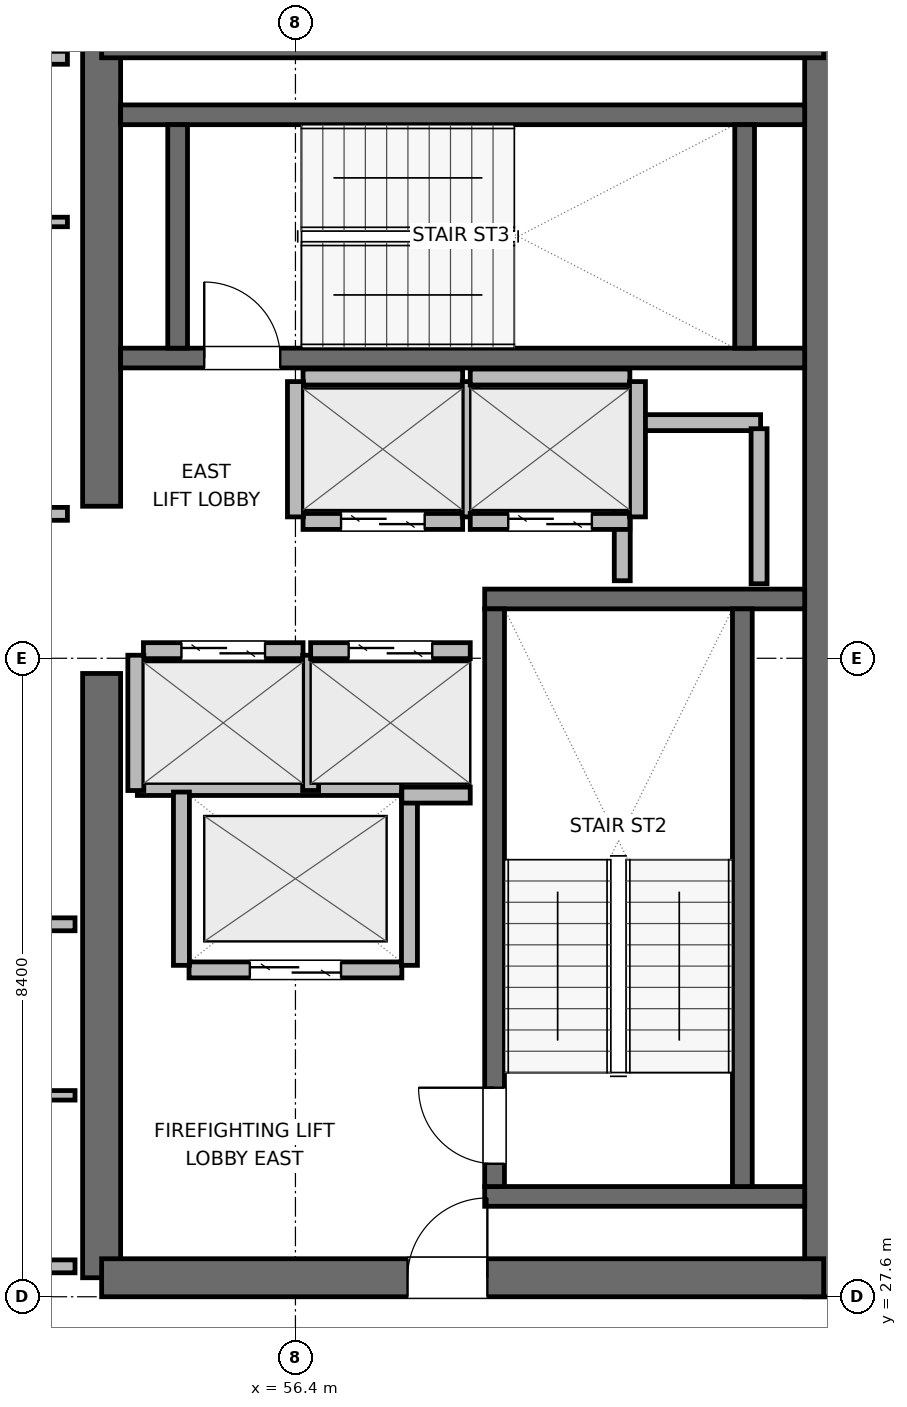
"""IFC4 building model, lengths in metres.
Left out: names, types, materials, properties, quantities, classifications, styles, units other than length and angle.
Written with IfcOpenShell. Run it as: python <this file> out.ifc"""

import sys

from ifc_helpers import new_model, si_unit, direction, frame, frame_2d, origin, place, context, subcontext, project, spatial, rectangle, extrude, element, fill, save


model = new_model("IFC4")
c1 = context("Model", 3, precision=1e-05, world=origin(), true_north=direction((0.0, 1.0)))
c2 = subcontext(c1, "Body", "Model", "MODEL_VIEW")
j1 = project(units=[si_unit("LENGTHUNIT", "METRE"), si_unit("PLANEANGLEUNIT", "RADIAN")], contexts=[c1])
p1 = place(None, origin())
s1 = spatial("IfcSite", under=j1, at=p1, CompositionType="ELEMENT")
p2 = place(p1, origin())
s2 = spatial("IfcBuilding", under=s1, at=p2, CompositionType="ELEMENT")
p3 = place(p2, frame((0.0, 0.0, 286.2)))
s3 = spatial("IfcBuildingStorey", under=s2, at=p3, CompositionType="ELEMENT", Elevation=286.2)
p4 = place(p3, frame((53.85, 27.85, 0.0), z_axis=(0.0, 0.0, 1.0), x_axis=(0.0, 1.0, 0.0)))
e1 = element("IfcWall", 1, at=p4, inside=s3, PredefinedType="SHEAR", context=c2, shape_type="SweptSolid", body=[
    extrude(rectangle(XDim=7.95, YDim=0.5, at=frame_2d((3.975, 0.0))), origin(), (0.0, 0.0, 1.0), 3.9),
])
p5 = place(p3, frame((53.85, 38.0, 0.0), z_axis=(0.0, 0.0, 1.0), x_axis=(0.0, 1.0, 0.0)))
e2 = element("IfcWall", 2, at=p5, inside=s3, PredefinedType="SHEAR", context=c2, shape_type="SweptSolid", body=[
    extrude(rectangle(XDim=6.15, YDim=0.5, at=frame_2d((3.075, 0.0))), origin(), (0.0, 0.0, 1.0), 3.9),
])
p6 = place(p3, frame((63.35, 27.6, 0.0), z_axis=(0.0, 0.0, 1.0), x_axis=(0.0, 1.0, 0.0)))
e3 = element("IfcWall", 3, at=p6, inside=s3, PredefinedType="SHEAR", context=c2, shape_type="SweptSolid", body=[
    extrude(rectangle(XDim=16.8, YDim=0.5, at=frame_2d((8.4, 0.0))), origin(), (0.0, 0.0, 1.0), 3.9),
])
p7 = place(p3, frame((53.85, 27.85, 0.0), z_axis=(0.0, 0.0, 1.0), x_axis=(1.0, 0.0, 0.0)))
e4 = element("IfcWall", 4, at=p7, inside=s3, PredefinedType="SHEAR", context=c2, shape_type="SweptSolid", body=[
    extrude(rectangle(XDim=9.5, YDim=0.5, at=frame_2d((4.75, 0.0))), origin(), (0.0, 0.0, 1.0), 3.9),
])
p8 = place(p7, frame((4.025, 0.0, 0.0)))
e5 = element("IfcOpeningElement", 5, at=p8, cuts=e4, PredefinedType="OPENING", context=c2, shape_type="SweptSolid", body=[
    extrude(rectangle(XDim=1.05, YDim=2.04, at=frame_2d((0.525, 1.02))), frame((0.0, 0.26, 0.0), z_axis=(0.0, -1.0, 0.0), x_axis=(1.0, 0.0, 0.0)), (0.0, 0.0, 1.0), 0.52),
])
p9 = place(p3, frame((53.85, 44.15, 0.0), z_axis=(0.0, 0.0, 1.0), x_axis=(1.0, 0.0, 0.0)))
e6 = element("IfcWall", 6, at=p9, inside=s3, PredefinedType="SHEAR", context=c2, shape_type="SweptSolid", body=[
    extrude(rectangle(XDim=9.5, YDim=0.5, at=frame_2d((4.75, 0.0))), origin(), (0.0, 0.0, 1.0), 3.9),
])
for number, where, z_axis, x_axis in (
    (7, (58.89, 28.92, 0.0), (0.0, 0.0, 1.0), (1.0, 0.0, 0.0)),
    (8, (58.89, 36.78, 0.0), (0.0, 0.0, 1.0), (1.0, 0.0, 0.0)),
):
    element("IfcWall", number, at=place(p3, frame(where, z_axis=z_axis, x_axis=x_axis)), inside=s3, PredefinedType="SHEAR", context=c2, shape_type="SweptSolid", body=[
        extrude(rectangle(XDim=4.21, YDim=0.26, at=frame_2d((2.105, 0.0))), origin(), (0.0, 0.0, 1.0), 3.9),
    ])
p10 = place(p3, frame((59.02, 29.05, 0.0), z_axis=(0.0, 0.0, 1.0), x_axis=(0.0, 1.0, 0.0)))
e9 = element("IfcWall", 9, at=p10, inside=s3, PredefinedType="SHEAR", context=c2, shape_type="SweptSolid", body=[
    extrude(rectangle(XDim=7.6, YDim=0.26, at=frame_2d((3.8, 0.0))), origin(), (0.0, 0.0, 1.0), 3.9),
])
p11 = place(p10, frame((0.3, 0.0, 0.0)))
e10 = element("IfcOpeningElement", 10, at=p11, cuts=e9, PredefinedType="OPENING", context=c2, shape_type="SweptSolid", body=[
    extrude(rectangle(XDim=1.0, YDim=2.04, at=frame_2d((0.5, 1.02))), frame((0.0, 0.14, 0.0), z_axis=(0.0, -1.0, 0.0), x_axis=(1.0, 0.0, 0.0)), (0.0, 0.0, 1.0), 0.28),
])
p12 = place(p3, frame((62.28, 29.05, 0.0), z_axis=(0.0, 0.0, 1.0), x_axis=(0.0, 1.0, 0.0)))
e11 = element("IfcWall", 11, at=p12, inside=s3, PredefinedType="SHEAR", context=c2, shape_type="SweptSolid", body=[
    extrude(rectangle(XDim=7.6, YDim=0.26, at=frame_2d((3.8, 0.0))), origin(), (0.0, 0.0, 1.0), 3.9),
])
p13 = place(p3, frame((54.1, 39.95, 0.0), z_axis=(0.0, 0.0, 1.0), x_axis=(1.0, 0.0, 0.0)))
e12 = element("IfcWall", 12, at=p13, inside=s3, PredefinedType="SHEAR", context=c2, shape_type="SweptSolid", body=[
    extrude(rectangle(XDim=9.0, YDim=0.26, at=frame_2d((4.5, 0.0))), origin(), (0.0, 0.0, 1.0), 3.9),
])
p14 = place(p13, frame((1.1, 0.0, 0.0)))
e13 = element("IfcOpeningElement", 13, at=p14, cuts=e12, PredefinedType="OPENING", context=c2, shape_type="SweptSolid", body=[
    extrude(rectangle(XDim=1.0, YDim=2.04, at=frame_2d((0.5, 1.02))), frame((0.0, 0.14, 0.0), z_axis=(0.0, -1.0, 0.0), x_axis=(1.0, 0.0, 0.0)), (0.0, 0.0, 1.0), 0.28),
])
p15 = place(p3, frame((54.1, 43.15, 0.0), z_axis=(0.0, 0.0, 1.0), x_axis=(1.0, 0.0, 0.0)))
e14 = element("IfcWall", 14, at=p15, inside=s3, PredefinedType="SHEAR", context=c2, shape_type="SweptSolid", body=[
    extrude(rectangle(XDim=9.0, YDim=0.26, at=frame_2d((4.5, 0.0))), origin(), (0.0, 0.0, 1.0), 3.9),
])
for number, where, z_axis, x_axis in (
    (15, (54.85, 40.08, 0.0), (0.0, 0.0, 1.0), (0.0, 1.0, 0.0)),
    (16, (62.31, 40.08, 0.0), (0.0, 0.0, 1.0), (0.0, 1.0, 0.0)),
):
    element("IfcWall", number, at=place(p3, frame(where, z_axis=z_axis, x_axis=x_axis)), inside=s3, PredefinedType="SHEAR", context=c2, shape_type="SweptSolid", body=[
        extrude(rectangle(XDim=2.94, YDim=0.26, at=frame_2d((1.47, 0.0))), origin(), (0.0, 0.0, 1.0), 3.9),
    ])
p16 = place(p3, frame((60.72, 39.1, 0.0), z_axis=(0.0, 0.0, 1.0), x_axis=(1.0, 0.0, 0.0)))
e17 = element("IfcWall", 17, at=p16, inside=s3, PredefinedType="PARTITIONING", context=c2, shape_type="SweptSolid", body=[
    extrude(rectangle(XDim=1.8, YDim=0.21, at=frame_2d((0.9, 0.0))), origin(), (0.0, 0.0, 1.0), 3.68),
])
p17 = place(p3, frame((60.7, 37.02, 0.0), z_axis=(0.0, 0.0, 1.0), x_axis=(0.0, 1.0, 0.0)))
e18 = element("IfcWall", 18, at=p17, inside=s3, PredefinedType="PARTITIONING", context=c2, shape_type="SweptSolid", body=[
    extrude(rectangle(XDim=1.96, YDim=0.21, at=frame_2d((0.98, 0.0))), origin(), (0.0, 0.0, 1.0), 3.68),
])
p18 = place(p3, frame((62.5, 36.98, 0.0), z_axis=(0.0, 0.0, 1.0), x_axis=(0.0, 1.0, 0.0)))
e19 = element("IfcWall", 19, at=p18, inside=s3, PredefinedType="PARTITIONING", context=c2, shape_type="SweptSolid", body=[
    extrude(rectangle(XDim=2.04, YDim=0.21, at=frame_2d((1.02, 0.0))), origin(), (0.0, 0.0, 1.0), 3.68),
])
p19 = place(p3, frame((55.0, 31.9, 0.0), z_axis=(0.0, 0.0, 1.0), x_axis=(1.0, 0.0, 0.0)))
e20 = element("IfcWall", 20, at=p19, inside=s3, PredefinedType="PARTITIONING", context=c2, shape_type="SweptSolid", body=[
    extrude(rectangle(XDim=2.8, YDim=0.21, at=frame_2d((1.4, 0.0))), origin(), (0.0, 0.0, 1.0), 3.68),
])
p20 = place(p19, frame((0.8, 0.0, 0.0)))
e21 = element("IfcOpeningElement", 21, at=p20, cuts=e20, PredefinedType="OPENING", context=c2, shape_type="SweptSolid", body=[
    extrude(rectangle(XDim=1.2, YDim=2.04, at=frame_2d((0.6, 1.02))), frame((0.0, 0.115, 0.0), z_axis=(0.0, -1.0, 0.0), x_axis=(1.0, 0.0, 0.0)), (0.0, 0.0, 1.0), 0.23),
])
p21 = place(p3, frame((54.32, 34.3, 0.0), z_axis=(0.0, 0.0, 1.0), x_axis=(1.0, 0.0, 0.0)))
e22 = element("IfcWall", 22, at=p21, inside=s3, PredefinedType="PARTITIONING", context=c2, shape_type="SweptSolid", body=[
    extrude(rectangle(XDim=3.48, YDim=0.21, at=frame_2d((1.74, 0.0))), origin(), (0.0, 0.0, 1.0), 3.68),
])
for number, where, z_axis, x_axis in (
    (23, (54.9, 31.96, 0.0), (0.0, 0.0, 1.0), (0.0, 1.0, 0.0)),
    (24, (57.9, 31.96, 0.0), (0.0, 0.0, 1.0), (0.0, 1.0, 0.0)),
):
    element("IfcWall", number, at=place(p3, frame(where, z_axis=z_axis, x_axis=x_axis)), inside=s3, PredefinedType="PARTITIONING", context=c2, shape_type="SweptSolid", body=[
        extrude(rectangle(XDim=2.28, YDim=0.21, at=frame_2d((1.14, 0.0))), origin(), (0.0, 0.0, 1.0), 3.68),
    ])
p22 = place(p3, frame((54.4, 36.1, 0.0), z_axis=(0.0, 0.0, 1.0), x_axis=(1.0, 0.0, 0.0)))
e25 = element("IfcWall", 25, at=p22, inside=s3, PredefinedType="PARTITIONING", context=c2, shape_type="SweptSolid", body=[
    extrude(rectangle(XDim=2.1, YDim=0.21, at=frame_2d((1.05, 0.0))), origin(), (0.0, 0.0, 1.0), 3.68),
])
p23 = place(p22, frame((0.5, 0.0, 0.0)))
e26 = element("IfcOpeningElement", 26, at=p23, cuts=e25, PredefinedType="OPENING", context=c2, shape_type="SweptSolid", body=[
    extrude(rectangle(XDim=1.1, YDim=2.04, at=frame_2d((0.55, 1.02))), frame((0.0, 0.115, 0.0), z_axis=(0.0, -1.0, 0.0), x_axis=(1.0, 0.0, 0.0)), (0.0, 0.0, 1.0), 0.23),
])
for number, where, z_axis, x_axis in (
    (27, (54.3, 34.26, 0.0), (0.0, 0.0, 1.0), (0.0, 1.0, 0.0)),
    (28, (56.6, 34.26, 0.0), (0.0, 0.0, 1.0), (0.0, 1.0, 0.0)),
):
    element("IfcWall", number, at=place(p3, frame(where, z_axis=z_axis, x_axis=x_axis)), inside=s3, PredefinedType="PARTITIONING", context=c2, shape_type="SweptSolid", body=[
        extrude(rectangle(XDim=1.78, YDim=0.21, at=frame_2d((0.89, 0.0))), origin(), (0.0, 0.0, 1.0), 3.68),
    ])
p24 = place(p3, frame((56.6, 36.1, 0.0), z_axis=(0.0, 0.0, 1.0), x_axis=(1.0, 0.0, 0.0)))
e29 = element("IfcWall", 29, at=p24, inside=s3, PredefinedType="PARTITIONING", context=c2, shape_type="SweptSolid", body=[
    extrude(rectangle(XDim=2.1, YDim=0.21, at=frame_2d((1.05, 0.0))), origin(), (0.0, 0.0, 1.0), 3.68),
])
p25 = place(p24, frame((0.5, 0.0, 0.0)))
e30 = element("IfcOpeningElement", 30, at=p25, cuts=e29, PredefinedType="OPENING", context=c2, shape_type="SweptSolid", body=[
    extrude(rectangle(XDim=1.1, YDim=2.04, at=frame_2d((0.55, 1.02))), frame((0.0, 0.115, 0.0), z_axis=(0.0, -1.0, 0.0), x_axis=(1.0, 0.0, 0.0)), (0.0, 0.0, 1.0), 0.23),
])
p26 = place(p3, frame((57.8, 34.2, 0.0), z_axis=(0.0, 0.0, 1.0), x_axis=(1.0, 0.0, 0.0)))
e31 = element("IfcWall", 31, at=p26, inside=s3, PredefinedType="PARTITIONING", context=c2, shape_type="SweptSolid", body=[
    extrude(rectangle(XDim=0.9, YDim=0.21, at=frame_2d((0.45, 0.0))), origin(), (0.0, 0.0, 1.0), 3.68),
])
p27 = place(p3, frame((56.5, 37.8, 0.0), z_axis=(0.0, 0.0, 1.0), x_axis=(1.0, 0.0, 0.0)))
e32 = element("IfcWall", 32, at=p27, inside=s3, PredefinedType="PARTITIONING", context=c2, shape_type="SweptSolid", body=[
    extrude(rectangle(XDim=2.1, YDim=0.21, at=frame_2d((1.05, 0.0))), origin(), (0.0, 0.0, 1.0), 3.68),
])
p28 = place(p27, frame((0.5, 0.0, 0.0)))
e33 = element("IfcOpeningElement", 33, at=p28, cuts=e32, PredefinedType="OPENING", context=c2, shape_type="SweptSolid", body=[
    extrude(rectangle(XDim=1.1, YDim=2.04, at=frame_2d((0.55, 1.02))), frame((0.0, 0.115, 0.0), z_axis=(0.0, -1.0, 0.0), x_axis=(1.0, 0.0, 0.0)), (0.0, 0.0, 1.0), 0.23),
])
p29 = place(p3, frame((56.5, 39.7, 0.0), z_axis=(0.0, 0.0, 1.0), x_axis=(1.0, 0.0, 0.0)))
e34 = element("IfcWall", 34, at=p29, inside=s3, PredefinedType="PARTITIONING", context=c2, shape_type="SweptSolid", body=[
    extrude(rectangle(XDim=2.1, YDim=0.21, at=frame_2d((1.05, 0.0))), origin(), (0.0, 0.0, 1.0), 3.68),
])
for number, where, z_axis, x_axis in (
    (35, (56.4, 37.86, 0.0), (0.0, 0.0, 1.0), (0.0, 1.0, 0.0)),
    (36, (58.7, 37.86, 0.0), (0.0, 0.0, 1.0), (0.0, 1.0, 0.0)),
):
    element("IfcWall", number, at=place(p3, frame(where, z_axis=z_axis, x_axis=x_axis)), inside=s3, PredefinedType="PARTITIONING", context=c2, shape_type="SweptSolid", body=[
        extrude(rectangle(XDim=1.78, YDim=0.21, at=frame_2d((0.89, 0.0))), origin(), (0.0, 0.0, 1.0), 3.68),
    ])
p30 = place(p3, frame((58.7, 37.8, 0.0), z_axis=(0.0, 0.0, 1.0), x_axis=(1.0, 0.0, 0.0)))
e37 = element("IfcWall", 37, at=p30, inside=s3, PredefinedType="PARTITIONING", context=c2, shape_type="SweptSolid", body=[
    extrude(rectangle(XDim=2.1, YDim=0.21, at=frame_2d((1.05, 0.0))), origin(), (0.0, 0.0, 1.0), 3.68),
])
p31 = place(p30, frame((0.5, 0.0, 0.0)))
e38 = element("IfcOpeningElement", 38, at=p31, cuts=e37, PredefinedType="OPENING", context=c2, shape_type="SweptSolid", body=[
    extrude(rectangle(XDim=1.1, YDim=2.04, at=frame_2d((0.55, 1.02))), frame((0.0, 0.115, 0.0), z_axis=(0.0, -1.0, 0.0), x_axis=(1.0, 0.0, 0.0)), (0.0, 0.0, 1.0), 0.23),
])
p32 = place(p3, frame((58.7, 39.7, 0.0), z_axis=(0.0, 0.0, 1.0), x_axis=(1.0, 0.0, 0.0)))
e39 = element("IfcWall", 39, at=p32, inside=s3, PredefinedType="PARTITIONING", context=c2, shape_type="SweptSolid", body=[
    extrude(rectangle(XDim=2.1, YDim=0.21, at=frame_2d((1.05, 0.0))), origin(), (0.0, 0.0, 1.0), 3.68),
])
p33 = place(p3, frame((60.9, 37.86, 0.0), z_axis=(0.0, 0.0, 1.0), x_axis=(0.0, 1.0, 0.0)))
e40 = element("IfcWall", 40, at=p33, inside=s3, PredefinedType="PARTITIONING", context=c2, shape_type="SweptSolid", body=[
    extrude(rectangle(XDim=1.78, YDim=0.21, at=frame_2d((0.89, 0.0))), origin(), (0.0, 0.0, 1.0), 3.68),
])
p34 = place(p3, frame((49.287, 28.0, 0.0), z_axis=(0.0, 0.0, 1.0), x_axis=(1.0, 0.0, 0.0)))
e41 = element("IfcWall", 41, at=p34, inside=s3, PredefinedType="PARTITIONING", context=c2, shape_type="SweptSolid", body=[
    extrude(rectangle(XDim=4.213, YDim=0.17, at=frame_2d((2.106, 0.0))), origin(), (0.0, 0.0, 1.0), 2.765),
])
p35 = place(p3, frame((52.2, 32.5, 0.0), z_axis=(0.0, 0.0, 1.0), x_axis=(1.0, 0.0, 0.0)))
e42 = element("IfcWall", 42, at=p35, inside=s3, PredefinedType="PARTITIONING", context=c2, shape_type="SweptSolid", body=[
    extrude(rectangle(XDim=1.3, YDim=0.17, at=frame_2d((0.65, 0.0))), origin(), (0.0, 0.0, 1.0), 3.68),
])
p36 = place(p3, frame((49.287, 30.25, 0.0), z_axis=(0.0, 0.0, 1.0), x_axis=(1.0, 0.0, 0.0)))
e43 = element("IfcWall", 43, at=p36, inside=s3, PredefinedType="PARTITIONING", context=c2, shape_type="SweptSolid", body=[
    extrude(rectangle(XDim=4.213, YDim=0.125, at=frame_2d((2.106, 0.0))), origin(), (0.0, 0.0, 1.0), 3.68),
])
p37 = place(p3, frame((49.287, 37.9, 0.0), z_axis=(0.0, 0.0, 1.0), x_axis=(1.0, 0.0, 0.0)))
e44 = element("IfcWall", 44, at=p37, inside=s3, PredefinedType="PARTITIONING", context=c2, shape_type="SweptSolid", body=[
    extrude(rectangle(XDim=4.113, YDim=0.17, at=frame_2d((2.056, 0.0))), origin(), (0.0, 0.0, 1.0), 3.68),
])
p38 = place(p3, frame((49.287, 43.9, 0.0), z_axis=(0.0, 0.0, 1.0), x_axis=(1.0, 0.0, 0.0)))
e45 = element("IfcWall", 45, at=p38, inside=s3, PredefinedType="PARTITIONING", context=c2, shape_type="SweptSolid", body=[
    extrude(rectangle(XDim=4.113, YDim=0.17, at=frame_2d((2.056, 0.0))), origin(), (0.0, 0.0, 1.0), 2.765),
])
p39 = place(p3, frame((49.287, 41.74, 0.0), z_axis=(0.0, 0.0, 1.0), x_axis=(1.0, 0.0, 0.0)))
e46 = element("IfcWall", 46, at=p39, inside=s3, PredefinedType="PARTITIONING", context=c2, shape_type="SweptSolid", body=[
    extrude(rectangle(XDim=4.113, YDim=0.125, at=frame_2d((2.056, 0.0))), origin(), (0.0, 0.0, 1.0), 3.68),
])
p40 = place(p11, origin())
e47 = element("IfcDoor", 47, at=p40, inside=s3, OperationType="SINGLE_SWING_RIGHT", PredefinedType="DOOR", context=c2, shape_type="SweptSolid", body=[
    extrude(rectangle(XDim=1.0, YDim=2.04, at=frame_2d((0.5, 1.02))), frame((0.0, 0.025, 0.0), z_axis=(0.0, -1.0, 0.0), x_axis=(1.0, 0.0, 0.0)), (0.0, 0.0, 1.0), 0.05),
])
fill(e10, e47)
p41 = place(p14, origin())
e48 = element("IfcDoor", 48, at=p41, inside=s3, OperationType="SINGLE_SWING_LEFT", PredefinedType="DOOR", context=c2, shape_type="SweptSolid", body=[
    extrude(rectangle(XDim=1.0, YDim=2.04, at=frame_2d((0.5, 1.02))), frame((0.0, 0.025, 0.0), z_axis=(0.0, -1.0, 0.0), x_axis=(1.0, 0.0, 0.0)), (0.0, 0.0, 1.0), 0.05),
])
fill(e13, e48)
p42 = place(p20, origin())
e49 = element("IfcDoor", 49, at=p42, inside=s3, OperationType="DOUBLE_DOOR_SLIDING", PredefinedType="DOOR", context=c2, shape_type="SweptSolid", body=[
    extrude(rectangle(XDim=1.2, YDim=2.04, at=frame_2d((0.6, 1.02))), frame((0.0, 0.025, 0.0), z_axis=(0.0, -1.0, 0.0), x_axis=(1.0, 0.0, 0.0)), (0.0, 0.0, 1.0), 0.05),
])
fill(e21, e49)
p43 = place(p23, origin())
e50 = element("IfcDoor", 50, at=p43, inside=s3, OperationType="DOUBLE_DOOR_SLIDING", PredefinedType="DOOR", context=c2, shape_type="SweptSolid", body=[
    extrude(rectangle(XDim=1.1, YDim=2.04, at=frame_2d((0.55, 1.02))), frame((0.0, 0.025, 0.0), z_axis=(0.0, -1.0, 0.0), x_axis=(1.0, 0.0, 0.0)), (0.0, 0.0, 1.0), 0.05),
])
fill(e26, e50)
p44 = place(p25, origin())
e51 = element("IfcDoor", 51, at=p44, inside=s3, OperationType="DOUBLE_DOOR_SLIDING", PredefinedType="DOOR", context=c2, shape_type="SweptSolid", body=[
    extrude(rectangle(XDim=1.1, YDim=2.04, at=frame_2d((0.55, 1.02))), frame((0.0, 0.025, 0.0), z_axis=(0.0, -1.0, 0.0), x_axis=(1.0, 0.0, 0.0)), (0.0, 0.0, 1.0), 0.05),
])
fill(e30, e51)
p45 = place(p28, origin())
e52 = element("IfcDoor", 52, at=p45, inside=s3, OperationType="DOUBLE_DOOR_SLIDING", PredefinedType="DOOR", context=c2, shape_type="SweptSolid", body=[
    extrude(rectangle(XDim=1.1, YDim=2.04, at=frame_2d((0.55, 1.02))), frame((0.0, 0.025, 0.0), z_axis=(0.0, -1.0, 0.0), x_axis=(1.0, 0.0, 0.0)), (0.0, 0.0, 1.0), 0.05),
])
fill(e33, e52)
p46 = place(p31, origin())
e53 = element("IfcDoor", 53, at=p46, inside=s3, OperationType="DOUBLE_DOOR_SLIDING", PredefinedType="DOOR", context=c2, shape_type="SweptSolid", body=[
    extrude(rectangle(XDim=1.1, YDim=2.04, at=frame_2d((0.55, 1.02))), frame((0.0, 0.025, 0.0), z_axis=(0.0, -1.0, 0.0), x_axis=(1.0, 0.0, 0.0)), (0.0, 0.0, 1.0), 0.05),
])
fill(e38, e53)
p47 = place(p8, origin())
e54 = element("IfcDoor", 54, at=p47, inside=s3, OperationType="SINGLE_SWING_RIGHT", PredefinedType="DOOR", context=c2, shape_type="SweptSolid", body=[
    extrude(rectangle(XDim=1.05, YDim=2.04, at=frame_2d((0.525, 1.02))), frame((0.0, 0.025, 0.0), z_axis=(0.0, -1.0, 0.0), x_axis=(1.0, 0.0, 0.0)), (0.0, 0.0, 1.0), 0.05),
])
fill(e5, e54)
save(model, sys.argv[1])
